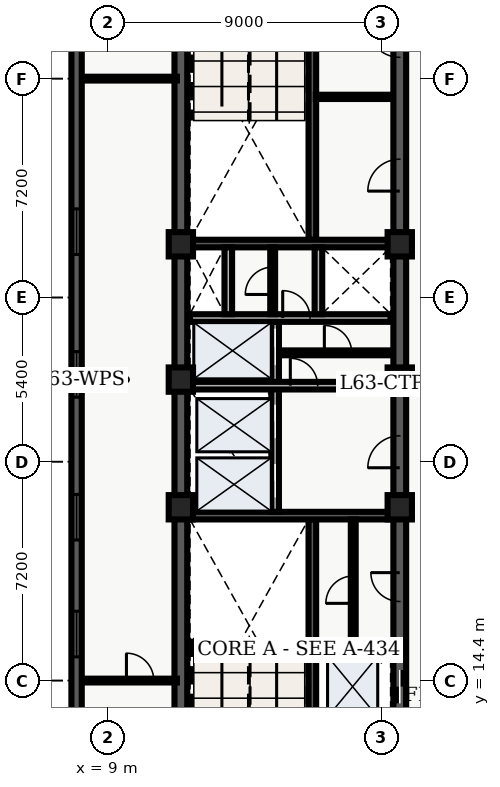
"""IFC4 building model, lengths in metres.
Left out: names, types, materials, properties, quantities, classifications, styles, units other than length and angle.
Written with IfcOpenShell. Run it as: python <this file> out.ifc"""

import sys

from ifc_helpers import new_model, entity, si_unit, converted_unit, direction, frame, origin_with_axes, origin_2d_with_axis, place, context, subcontext, project, spatial, polyline, rectangle, outline, extrude, element, fill, save


model = new_model("IFC4")
c1 = context("Model", 3, precision=1e-05, world=origin_with_axes(), true_north=direction((0.0, 1.0)))
c2 = subcontext(c1, "Body", "Model", "MODEL_VIEW")
j1 = project(units=[si_unit("LENGTHUNIT", "METRE"), converted_unit("PLANEANGLEUNIT", "DEGREE", entity("IfcPlaneAngleMeasure", 0.017), si_unit("PLANEANGLEUNIT", "RADIAN"), dimensions=[0, 0, 0, 0, 0, 0, 0])], contexts=[c1])
p1 = place(None, origin_with_axes())
s1 = spatial("IfcSite", under=j1, at=p1, CompositionType="ELEMENT")
p2 = place(p1, origin_with_axes())
s2 = spatial("IfcBuilding", under=s1, at=p2, CompositionType="ELEMENT")
p3 = place(p2, frame((0.0, 0.0, 256.8), z_axis=(0.0, 0.0, 1.0), x_axis=(1.0, 0.0, 0.0)))
s3 = spatial("IfcBuildingStorey", under=s2, at=p3, CompositionType="ELEMENT", Elevation=256.8)
p4 = place(p3, frame((11.4, 10.8, 0.0), z_axis=(0.0, 0.0, 1.0), x_axis=(0.0, 1.0, 0.0)))
e1 = element("IfcWall", 1, at=p4, inside=s3, PredefinedType="SHEAR", context=c2, shape_type="SweptSolid", body=[
    extrude(outline(polyline([(0.0, -0.21), (27.0, -0.21), (27.0, 0.21), (0.0, 0.21), (0.0, -0.21)])), origin_with_axes(), (0.0, 0.0, 1.0), 3.66),
])
p5 = place(p3, frame((18.6, 10.8, 0.0), z_axis=(0.0, 0.0, 1.0), x_axis=(0.0, 1.0, 0.0)))
e2 = element("IfcWall", 2, at=p5, inside=s3, PredefinedType="SHEAR", context=c2, shape_type="SweptSolid", body=[
    extrude(outline(polyline([(0.0, -0.21), (13.5, -0.21), (13.5, 0.21), (0.0, 0.21), (0.0, -0.21)])), origin_with_axes(), (0.0, 0.0, 1.0), 3.66),
])
p6 = place(p5, frame((1.3, 0.0, 0.0), z_axis=(0.0, 0.0, 1.0), x_axis=(1.0, 0.0, 0.0)))
e3 = element("IfcOpeningElement", 3, at=p6, cuts=e2, PredefinedType="OPENING", context=c2, shape_type="SweptSolid", body=[
    extrude(rectangle(XDim=1.1, YDim=0.44, at=origin_2d_with_axis()), origin_with_axes(), (0.0, 0.0, 1.0), 2.15),
])
p7 = place(p5, frame((3.4, 0.0, 0.0), z_axis=(0.0, 0.0, 1.0), x_axis=(1.0, 0.0, 0.0)))
e4 = element("IfcOpeningElement", 4, at=p7, cuts=e2, PredefinedType="OPENING", context=c2, shape_type="SweptSolid", body=[
    extrude(rectangle(XDim=1.1, YDim=0.44, at=origin_2d_with_axis()), origin_with_axes(), (0.0, 0.0, 1.0), 2.15),
])
p8 = place(p5, frame((11.125, 0.0, 0.0), z_axis=(0.0, 0.0, 1.0), x_axis=(1.0, 0.0, 0.0)))
e5 = element("IfcOpeningElement", 5, at=p8, cuts=e2, PredefinedType="OPENING", context=c2, shape_type="SweptSolid", body=[
    extrude(rectangle(XDim=1.05, YDim=0.44, at=origin_2d_with_axis()), origin_with_axes(), (0.0, 0.0, 1.0), 2.15),
])
p9 = place(p5, frame((6.675, 0.0, 0.0), z_axis=(0.0, 0.0, 1.0), x_axis=(1.0, 0.0, 0.0)))
e6 = element("IfcOpeningElement", 6, at=p9, cuts=e2, PredefinedType="OPENING", context=c2, shape_type="SweptSolid", body=[
    extrude(rectangle(XDim=0.95, YDim=0.44, at=origin_2d_with_axis()), origin_with_axes(), (0.0, 0.0, 1.0), 2.15),
])
p10 = place(p3, frame((18.6, 24.3, 0.0), z_axis=(0.0, 0.0, 1.0), x_axis=(0.0, 1.0, 0.0)))
e7 = element("IfcWall", 7, at=p10, inside=s3, PredefinedType="SHEAR", context=c2, shape_type="SweptSolid", body=[
    extrude(outline(polyline([(0.0, -0.21), (13.5, -0.21), (13.5, 0.21), (0.0, 0.21), (0.0, -0.21)])), origin_with_axes(), (0.0, 0.0, 1.0), 3.66),
])
p11 = place(p10, frame((6.725, 0.0, 0.0), z_axis=(0.0, 0.0, 1.0), x_axis=(1.0, 0.0, 0.0)))
e8 = element("IfcOpeningElement", 8, at=p11, cuts=e7, PredefinedType="OPENING", context=c2, shape_type="SweptSolid", body=[
    extrude(rectangle(XDim=1.05, YDim=0.44, at=origin_2d_with_axis()), origin_with_axes(), (0.0, 0.0, 1.0), 2.15),
])
p12 = place(p10, frame((11.125, 0.0, 0.0), z_axis=(0.0, 0.0, 1.0), x_axis=(1.0, 0.0, 0.0)))
e9 = element("IfcOpeningElement", 9, at=p12, cuts=e7, PredefinedType="OPENING", context=c2, shape_type="SweptSolid", body=[
    extrude(rectangle(XDim=1.05, YDim=0.44, at=origin_2d_with_axis()), origin_with_axes(), (0.0, 0.0, 1.0), 2.15),
])
p13 = place(p3, frame((15.725, 11.01, 0.0), z_axis=(0.0, 0.0, 1.0), x_axis=(0.0, 1.0, 0.0)))
e10 = element("IfcWall", 10, at=p13, inside=s3, PredefinedType="SHEAR", context=c2, shape_type="SweptSolid", body=[
    extrude(outline(polyline([(0.0, -0.125), (8.69, -0.125), (8.69, 0.125), (0.0, 0.125), (0.0, -0.125)])), origin_with_axes(), (0.0, 0.0, 1.0), 3.66),
])
p14 = place(p3, frame((11.61, 19.825, 0.0), z_axis=(0.0, 0.0, 1.0), x_axis=(1.0, 0.0, 0.0)))
e11 = element("IfcWall", 11, at=p14, inside=s3, PredefinedType="SHEAR", context=c2, shape_type="SweptSolid", body=[
    extrude(outline(polyline([(0.0, -0.125), (6.78, -0.125), (6.78, 0.125), (0.0, 0.125), (0.0, -0.125)])), origin_with_axes(), (0.0, 0.0, 1.0), 3.66),
])
p15 = place(p3, frame((15.725, 28.9, 0.0), z_axis=(0.0, 0.0, 1.0), x_axis=(0.0, 1.0, 0.0)))
e12 = element("IfcWall", 12, at=p15, inside=s3, PredefinedType="SHEAR", context=c2, shape_type="SweptSolid", body=[
    extrude(outline(polyline([(0.0, -0.125), (8.69, -0.125), (8.69, 0.125), (0.0, 0.125), (0.0, -0.125)])), origin_with_axes(), (0.0, 0.0, 1.0), 3.66),
])
p16 = place(p3, frame((11.61, 28.775, 0.0), z_axis=(0.0, 0.0, 1.0), x_axis=(1.0, 0.0, 0.0)))
e13 = element("IfcWall", 13, at=p16, inside=s3, PredefinedType="SHEAR", context=c2, shape_type="SweptSolid", body=[
    extrude(outline(polyline([(0.0, -0.125), (6.78, -0.125), (6.78, 0.125), (0.0, 0.125), (0.0, -0.125)])), origin_with_axes(), (0.0, 0.0, 1.0), 3.66),
])
p17 = place(p3, frame((14.5, 19.95, 0.0), z_axis=(0.0, 0.0, 1.0), x_axis=(0.0, 1.0, 0.0)))
e14 = element("IfcWall", 14, at=p17, inside=s3, PredefinedType="SOLIDWALL", context=c2, shape_type="SweptSolid", body=[
    extrude(outline(polyline([(0.0, -0.125), (6.25, -0.125), (6.25, 0.125), (0.0, 0.125), (0.0, -0.125)])), origin_with_axes(), (0.0, 0.0, 1.0), 2.7),
])
p18 = place(p17, frame((1.025, 0.0, 0.0), z_axis=(0.0, 0.0, 1.0), x_axis=(1.0, 0.0, 0.0)))
e15 = element("IfcOpeningElement", 15, at=p18, cuts=e14, PredefinedType="OPENING", context=c2, shape_type="SweptSolid", body=[
    extrude(rectangle(XDim=1.1, YDim=0.27, at=origin_2d_with_axis()), origin_with_axes(), (0.0, 0.0, 1.0), 2.15),
])
p19 = place(p17, frame((2.975, 0.0, 0.0), z_axis=(0.0, 0.0, 1.0), x_axis=(1.0, 0.0, 0.0)))
e16 = element("IfcOpeningElement", 16, at=p19, cuts=e14, PredefinedType="OPENING", context=c2, shape_type="SweptSolid", body=[
    extrude(rectangle(XDim=1.1, YDim=0.27, at=origin_2d_with_axis()), origin_with_axes(), (0.0, 0.0, 1.0), 2.15),
])
p20 = place(p17, frame((5.425, 0.0, 0.0), z_axis=(0.0, 0.0, 1.0), x_axis=(1.0, 0.0, 0.0)))
e17 = element("IfcOpeningElement", 17, at=p20, cuts=e14, PredefinedType="OPENING", context=c2, shape_type="SweptSolid", body=[
    extrude(rectangle(XDim=1.2, YDim=0.27, at=origin_2d_with_axis()), origin_with_axes(), (0.0, 0.0, 1.0), 2.15),
])
p21 = place(p3, frame((11.7, 24.1, 0.0), z_axis=(0.0, 0.0, 1.0), x_axis=(1.0, 0.0, 0.0)))
e18 = element("IfcWall", 18, at=p21, inside=s3, PredefinedType="SOLIDWALL", context=c2, shape_type="SweptSolid", body=[
    extrude(outline(polyline([(0.0, -0.125), (6.6, -0.125), (6.6, 0.125), (0.0, 0.125), (0.0, -0.125)])), origin_with_axes(), (0.0, 0.0, 1.0), 2.7),
])
p22 = place(p21, frame((3.75, 0.0, 0.0), z_axis=(0.0, 0.0, 1.0), x_axis=(1.0, 0.0, 0.0)))
e19 = element("IfcOpeningElement", 19, at=p22, cuts=e18, PredefinedType="OPENING", context=c2, shape_type="SweptSolid", body=[
    extrude(rectangle(XDim=0.9, YDim=0.27, at=origin_2d_with_axis()), origin_with_axes(), (0.0, 0.0, 1.0), 2.15),
])
p23 = place(p3, frame((11.7, 26.325, 0.0), z_axis=(0.0, 0.0, 1.0), x_axis=(1.0, 0.0, 0.0)))
e20 = element("IfcWall", 20, at=p23, inside=s3, PredefinedType="SOLIDWALL", context=c2, shape_type="SweptSolid", body=[
    extrude(outline(polyline([(0.0, -0.125), (6.6, -0.125), (6.6, 0.125), (0.0, 0.125), (0.0, -0.125)])), origin_with_axes(), (0.0, 0.0, 1.0), 2.7),
])
p24 = place(p23, frame((3.5, 0.0, 0.0), z_axis=(0.0, 0.0, 1.0), x_axis=(1.0, 0.0, 0.0)))
e21 = element("IfcOpeningElement", 21, at=p24, cuts=e20, PredefinedType="OPENING", context=c2, shape_type="SweptSolid", body=[
    extrude(rectangle(XDim=0.9, YDim=0.27, at=origin_2d_with_axis()), origin_with_axes(), (0.0, 0.0, 1.0), 2.15),
])
for number, where, z_axis, x_axis in (
    (22, (12.96, 26.45, 0.0), (0.0, 0.0, 1.0), (0.0, 1.0, 0.0)),
    (23, (15.925, 26.45, 0.0), (0.0, 0.0, 1.0), (0.0, 1.0, 0.0)),
):
    element("IfcWall", number, at=place(p3, frame(where, z_axis=z_axis, x_axis=x_axis)), inside=s3, PredefinedType="SOLIDWALL", context=c2, shape_type="SweptSolid", body=[
        extrude(outline(polyline([(0.0, -0.125), (2.2, -0.125), (2.2, 0.125), (0.0, 0.125), (0.0, -0.125)])), origin_with_axes(), (0.0, 0.0, 1.0), 2.7),
    ])
for number, where, z_axis, x_axis in (
    (24, (11.4, 20.1, 0.0), (0.0, 0.0, 1.0), (1.0, 0.0, 0.0)),
    (25, (11.4, 24.3, 0.0), (0.0, 0.0, 1.0), (1.0, 0.0, 0.0)),
    (26, (11.4, 28.75, 0.0), (0.0, 0.0, 1.0), (1.0, 0.0, 0.0)),
    (27, (18.6, 20.1, 0.0), (0.0, 0.0, 1.0), (1.0, 0.0, 0.0)),
    (28, (18.6, 24.3, 0.0), (0.0, 0.0, 1.0), (1.0, 0.0, 0.0)),
    (29, (18.6, 28.75, 0.0), (0.0, 0.0, 1.0), (1.0, 0.0, 0.0)),
):
    element("IfcColumn", number, at=place(p3, frame(where, z_axis=z_axis, x_axis=x_axis)), inside=s3, PredefinedType="COLUMN", context=c2, shape_type="SweptSolid", body=[
        extrude(rectangle(XDim=0.8, YDim=0.8, at=origin_2d_with_axis()), origin_with_axes(), (0.0, 0.0, 1.0), 3.9),
    ])
p25 = place(p3, frame((14.62, 25.18, 0.0), z_axis=(0.0, 0.0, 1.0), x_axis=(1.0, 0.0, 0.0)))
e30 = element("IfcWall", 30, at=p25, inside=s3, PredefinedType="PARTITIONING", context=c2, shape_type="SweptSolid", body=[
    extrude(outline(polyline([(0.0, -0.08), (3.68, -0.08), (3.68, 0.08), (0.0, 0.08), (0.0, -0.08)])), origin_with_axes(), (0.0, 0.0, 1.0), 2.7),
])
p26 = place(p25, frame((1.95, 0.0, 0.0), z_axis=(0.0, 0.0, 1.0), x_axis=(1.0, 0.0, 0.0)))
e31 = element("IfcOpeningElement", 31, at=p26, cuts=e30, PredefinedType="OPENING", context=c2, shape_type="SweptSolid", body=[
    extrude(rectangle(XDim=0.9, YDim=0.18, at=origin_2d_with_axis()), origin_with_axes(), (0.0, 0.0, 1.0), 2.15),
])
p27 = place(p3, frame((14.42, 26.45, 0.0), z_axis=(0.0, 0.0, 1.0), x_axis=(0.0, 1.0, 0.0)))
e32 = element("IfcWall", 32, at=p27, inside=s3, PredefinedType="PARTITIONING", context=c2, shape_type="SweptSolid", body=[
    extrude(outline(polyline([(0.0, -0.08), (2.2, -0.08), (2.2, 0.08), (0.0, 0.08), (0.0, -0.08)])), origin_with_axes(), (0.0, 0.0, 1.0), 2.7),
])
p28 = place(p27, frame((1.1, 0.0, 0.0), z_axis=(0.0, 0.0, 1.0), x_axis=(1.0, 0.0, 0.0)))
e33 = element("IfcOpeningElement", 33, at=p28, cuts=e32, PredefinedType="OPENING", context=c2, shape_type="SweptSolid", body=[
    extrude(rectangle(XDim=0.9, YDim=0.18, at=origin_2d_with_axis()), origin_with_axes(), (0.0, 0.0, 1.0), 2.15),
])
p29 = place(p3, frame((15.84, 15.27, 0.0), z_axis=(0.0, 0.0, 1.0), x_axis=(1.0, 0.0, 0.0)))
e34 = element("IfcWall", 34, at=p29, inside=s3, PredefinedType="SOLIDWALL", context=c2, shape_type="SweptSolid", body=[
    extrude(outline(polyline([(0.0, -0.125), (2.46, -0.125), (2.46, 0.125), (0.0, 0.125), (0.0, -0.125)])), origin_with_axes(), (0.0, 0.0, 1.0), 2.7),
])
p30 = place(p3, frame((17.07, 15.34, 0.0), z_axis=(0.0, 0.0, 1.0), x_axis=(0.0, 1.0, 0.0)))
e35 = element("IfcWall", 35, at=p30, inside=s3, PredefinedType="PARTITIONING", context=c2, shape_type="SweptSolid", body=[
    extrude(outline(polyline([(0.0, -0.08), (4.36, -0.08), (4.36, 0.08), (0.0, 0.08), (0.0, -0.08)])), origin_with_axes(), (0.0, 0.0, 1.0), 2.7),
])
p31 = place(p30, frame((2.05, 0.0, 0.0), z_axis=(0.0, 0.0, 1.0), x_axis=(1.0, 0.0, 0.0)))
e36 = element("IfcOpeningElement", 36, at=p31, cuts=e35, PredefinedType="OPENING", context=c2, shape_type="SweptSolid", body=[
    extrude(rectangle(XDim=0.9, YDim=0.18, at=origin_2d_with_axis()), origin_with_axes(), (0.0, 0.0, 1.0), 2.15),
])
p32 = place(p3, frame((15.84, 33.6, 0.0), z_axis=(0.0, 0.0, 1.0), x_axis=(1.0, 0.0, 0.0)))
e37 = element("IfcWall", 37, at=p32, inside=s3, PredefinedType="PARTITIONING", context=c2, shape_type="SweptSolid", body=[
    extrude(outline(polyline([(0.0, -0.07), (2.46, -0.07), (2.46, 0.07), (0.0, 0.07), (0.0, -0.07)])), origin_with_axes(), (0.0, 0.0, 1.0), 2.7),
])
p33 = place(p3, frame((8.135, 14.4, 0.0), z_axis=(0.0, 0.0, 1.0), x_axis=(1.0, 0.0, 0.0)))
e38 = element("IfcWall", 38, at=p33, inside=s3, PredefinedType="PARTITIONING", context=c2, shape_type="SweptSolid", body=[
    extrude(outline(polyline([(0.0, -0.062), (3.135, -0.062), (3.135, 0.062), (0.0, 0.062), (0.0, -0.062)])), origin_with_axes(), (0.0, 0.0, 1.0), 2.7),
])
p34 = place(p33, frame((1.925, 0.0, 0.0), z_axis=(0.0, 0.0, 1.0), x_axis=(1.0, 0.0, 0.0)))
e39 = element("IfcOpeningElement", 39, at=p34, cuts=e38, PredefinedType="OPENING", context=c2, shape_type="SweptSolid", body=[
    extrude(rectangle(XDim=0.9, YDim=0.145, at=origin_2d_with_axis()), origin_with_axes(), (0.0, 0.0, 1.0), 2.15),
])
p35 = place(p3, frame((8.135, 34.2, 0.0), z_axis=(0.0, 0.0, 1.0), x_axis=(1.0, 0.0, 0.0)))
e40 = element("IfcWall", 40, at=p35, inside=s3, PredefinedType="PARTITIONING", context=c2, shape_type="SweptSolid", body=[
    extrude(outline(polyline([(0.0, -0.062), (3.135, -0.062), (3.135, 0.062), (0.0, 0.062), (0.0, -0.062)])), origin_with_axes(), (0.0, 0.0, 1.0), 2.7),
])
p36 = place(p3, frame((7.97, 2.74, 0.0), z_axis=(0.0, 0.0, 1.0), x_axis=(0.0, 1.0, 0.0)))
e41 = element("IfcWall", 41, at=p36, inside=s3, PredefinedType="SOLIDWALL", context=c2, shape_type="SweptSolid", body=[
    extrude(outline(polyline([(0.0, -0.17), (43.46, -0.17), (43.46, 0.17), (0.0, 0.17), (0.0, -0.17)])), origin_with_axes(), (0.0, 0.0, 1.0), 3.66),
])
p37 = place(p36, frame((2.948, 0.0, 0.45), z_axis=(0.0, 0.0, 1.0), x_axis=(1.0, 0.0, 0.0)))
e42 = element("IfcOpeningElement", 42, at=p37, cuts=e41, PredefinedType="OPENING", context=c2, shape_type="SweptSolid", body=[
    extrude(rectangle(XDim=1.5, YDim=0.36, at=origin_2d_with_axis()), origin_with_axes(), (0.0, 0.0, 1.0), 2.1),
])
p38 = place(p36, frame((7.643, 0.0, 0.45), z_axis=(0.0, 0.0, 1.0), x_axis=(1.0, 0.0, 0.0)))
e43 = element("IfcOpeningElement", 43, at=p38, cuts=e41, PredefinedType="OPENING", context=c2, shape_type="SweptSolid", body=[
    extrude(rectangle(XDim=1.5, YDim=0.36, at=origin_2d_with_axis()), origin_with_axes(), (0.0, 0.0, 1.0), 2.1),
])
p39 = place(p36, frame((13.189, 0.0, 0.45), z_axis=(0.0, 0.0, 1.0), x_axis=(1.0, 0.0, 0.0)))
e44 = element("IfcOpeningElement", 44, at=p39, cuts=e41, PredefinedType="OPENING", context=c2, shape_type="SweptSolid", body=[
    extrude(rectangle(XDim=1.5, YDim=0.36, at=origin_2d_with_axis()), origin_with_axes(), (0.0, 0.0, 1.0), 2.1),
])
p40 = place(p36, frame((17.034, 0.0, 0.45), z_axis=(0.0, 0.0, 1.0), x_axis=(1.0, 0.0, 0.0)))
e45 = element("IfcOpeningElement", 45, at=p40, cuts=e41, PredefinedType="OPENING", context=c2, shape_type="SweptSolid", body=[
    extrude(rectangle(XDim=1.5, YDim=0.36, at=origin_2d_with_axis()), origin_with_axes(), (0.0, 0.0, 1.0), 2.1),
])
p41 = place(p36, frame((21.73, 0.0, 0.45), z_axis=(0.0, 0.0, 1.0), x_axis=(1.0, 0.0, 0.0)))
e46 = element("IfcOpeningElement", 46, at=p41, cuts=e41, PredefinedType="OPENING", context=c2, shape_type="SweptSolid", body=[
    extrude(rectangle(XDim=1.5, YDim=0.36, at=origin_2d_with_axis()), origin_with_axes(), (0.0, 0.0, 1.0), 2.1),
])
p42 = place(p36, frame((26.426, 0.0, 0.45), z_axis=(0.0, 0.0, 1.0), x_axis=(1.0, 0.0, 0.0)))
e47 = element("IfcOpeningElement", 47, at=p42, cuts=e41, PredefinedType="OPENING", context=c2, shape_type="SweptSolid", body=[
    extrude(rectangle(XDim=1.5, YDim=0.36, at=origin_2d_with_axis()), origin_with_axes(), (0.0, 0.0, 1.0), 2.1),
])
p43 = place(p36, frame((35.817, 0.0, 0.45), z_axis=(0.0, 0.0, 1.0), x_axis=(1.0, 0.0, 0.0)))
e48 = element("IfcOpeningElement", 48, at=p43, cuts=e41, PredefinedType="OPENING", context=c2, shape_type="SweptSolid", body=[
    extrude(rectangle(XDim=1.5, YDim=0.36, at=origin_2d_with_axis()), origin_with_axes(), (0.0, 0.0, 1.0), 2.1),
])
p44 = place(p36, frame((40.512, 0.0, 0.45), z_axis=(0.0, 0.0, 1.0), x_axis=(1.0, 0.0, 0.0)))
e49 = element("IfcOpeningElement", 49, at=p44, cuts=e41, PredefinedType="OPENING", context=c2, shape_type="SweptSolid", body=[
    extrude(rectangle(XDim=1.5, YDim=0.36, at=origin_2d_with_axis()), origin_with_axes(), (0.0, 0.0, 1.0), 2.1),
])
p45 = place(p5, frame((3.4, 0.0, 0.0), z_axis=(0.0, 0.0, 1.0), x_axis=(1.0, 0.0, 0.0)))
e50 = element("IfcDoor", 50, at=p45, inside=s3, OperationType="SLIDING_TO_RIGHT", PredefinedType="DOOR", context=c2, shape_type="SweptSolid", body=[
    extrude(rectangle(XDim=1.1, YDim=0.09, at=origin_2d_with_axis()), origin_with_axes(), (0.0, 0.0, 1.0), 2.15),
])
fill(e4, e50)
p46 = place(p17, frame((1.025, 0.0, 0.0), z_axis=(0.0, 0.0, 1.0), x_axis=(1.0, 0.0, 0.0)))
e51 = element("IfcDoor", 51, at=p46, inside=s3, OperationType="SLIDING_TO_LEFT", PredefinedType="DOOR", context=c2, shape_type="SweptSolid", body=[
    extrude(rectangle(XDim=1.1, YDim=0.09, at=origin_2d_with_axis()), origin_with_axes(), (0.0, 0.0, 1.0), 2.15),
])
fill(e15, e51)
p47 = place(p17, frame((2.975, 0.0, 0.0), z_axis=(0.0, 0.0, 1.0), x_axis=(1.0, 0.0, 0.0)))
e52 = element("IfcDoor", 52, at=p47, inside=s3, OperationType="SLIDING_TO_RIGHT", PredefinedType="DOOR", context=c2, shape_type="SweptSolid", body=[
    extrude(rectangle(XDim=1.1, YDim=0.09, at=origin_2d_with_axis()), origin_with_axes(), (0.0, 0.0, 1.0), 2.15),
])
fill(e16, e52)
p48 = place(p17, frame((5.425, 0.0, 0.0), z_axis=(0.0, 0.0, 1.0), x_axis=(1.0, 0.0, 0.0)))
e53 = element("IfcDoor", 53, at=p48, inside=s3, OperationType="DOUBLE_DOOR_SLIDING", PredefinedType="DOOR", context=c2, shape_type="SweptSolid", body=[
    extrude(rectangle(XDim=1.2, YDim=0.09, at=origin_2d_with_axis()), origin_with_axes(), (0.0, 0.0, 1.0), 2.15),
])
fill(e17, e53)
p49 = place(p5, frame((11.125, 0.0, 0.0), z_axis=(0.0, 0.0, 1.0), x_axis=(1.0, 0.0, 0.0)))
e54 = element("IfcDoor", 54, at=p49, inside=s3, OperationType="SINGLE_SWING_LEFT", PredefinedType="DOOR", context=c2, shape_type="SweptSolid", body=[
    extrude(rectangle(XDim=1.05, YDim=0.09, at=origin_2d_with_axis()), origin_with_axes(), (0.0, 0.0, 1.0), 2.15),
])
fill(e5, e54)
p50 = place(p23, frame((3.5, 0.0, 0.0), z_axis=(0.0, 0.0, 1.0), x_axis=(1.0, 0.0, 0.0)))
e55 = element("IfcDoor", 55, at=p50, inside=s3, OperationType="SINGLE_SWING_LEFT", PredefinedType="DOOR", context=c2, shape_type="SweptSolid", body=[
    extrude(rectangle(XDim=0.9, YDim=0.09, at=origin_2d_with_axis()), origin_with_axes(), (0.0, 0.0, 1.0), 2.15),
])
fill(e21, e55)
p51 = place(p27, frame((1.1, 0.0, 0.0), z_axis=(0.0, 0.0, 1.0), x_axis=(1.0, 0.0, 0.0)))
e56 = element("IfcDoor", 56, at=p51, inside=s3, OperationType="SINGLE_SWING_LEFT", PredefinedType="DOOR", context=c2, shape_type="SweptSolid", body=[
    extrude(rectangle(XDim=0.9, YDim=0.09, at=origin_2d_with_axis()), origin_with_axes(), (0.0, 0.0, 1.0), 2.15),
])
fill(e33, e56)
p52 = place(p21, frame((3.75, 0.0, 0.0), z_axis=(0.0, 0.0, 1.0), x_axis=(1.0, 0.0, 0.0)))
e57 = element("IfcDoor", 57, at=p52, inside=s3, OperationType="SINGLE_SWING_LEFT", PredefinedType="DOOR", context=c2, shape_type="SweptSolid", body=[
    extrude(rectangle(XDim=0.9, YDim=0.09, at=origin_2d_with_axis()), origin_with_axes(), (0.0, 0.0, 1.0), 2.15),
])
fill(e19, e57)
p53 = place(p25, frame((1.95, 0.0, 0.0), z_axis=(0.0, 0.0, 1.0), x_axis=(1.0, 0.0, 0.0)))
e58 = element("IfcDoor", 58, at=p53, inside=s3, OperationType="SINGLE_SWING_LEFT", PredefinedType="DOOR", context=c2, shape_type="SweptSolid", body=[
    extrude(rectangle(XDim=0.9, YDim=0.09, at=origin_2d_with_axis()), origin_with_axes(), (0.0, 0.0, 1.0), 2.15),
])
fill(e31, e58)
p54 = place(p30, frame((2.05, 0.0, 0.0), z_axis=(0.0, 0.0, 1.0), x_axis=(1.0, 0.0, 0.0)))
e59 = element("IfcDoor", 59, at=p54, inside=s3, OperationType="SINGLE_SWING_LEFT", PredefinedType="DOOR", context=c2, shape_type="SweptSolid", body=[
    extrude(rectangle(XDim=0.9, YDim=0.09, at=origin_2d_with_axis()), origin_with_axes(), (0.0, 0.0, 1.0), 2.15),
])
fill(e36, e59)
p55 = place(p5, frame((6.675, 0.0, 0.0), z_axis=(0.0, 0.0, 1.0), x_axis=(1.0, 0.0, 0.0)))
e60 = element("IfcDoor", 60, at=p55, inside=s3, OperationType="SINGLE_SWING_RIGHT", PredefinedType="DOOR", context=c2, shape_type="SweptSolid", body=[
    extrude(rectangle(XDim=0.95, YDim=0.09, at=origin_2d_with_axis()), origin_with_axes(), (0.0, 0.0, 1.0), 2.15),
])
fill(e6, e60)
p56 = place(p10, frame((6.725, 0.0, 0.0), z_axis=(0.0, 0.0, 1.0), x_axis=(1.0, 0.0, 0.0)))
e61 = element("IfcDoor", 61, at=p56, inside=s3, OperationType="SINGLE_SWING_LEFT", PredefinedType="DOOR", context=c2, shape_type="SweptSolid", body=[
    extrude(rectangle(XDim=1.05, YDim=0.09, at=origin_2d_with_axis()), origin_with_axes(), (0.0, 0.0, 1.0), 2.15),
])
fill(e8, e61)
p57 = place(p10, frame((11.125, 0.0, 0.0), z_axis=(0.0, 0.0, 1.0), x_axis=(1.0, 0.0, 0.0)))
e62 = element("IfcDoor", 62, at=p57, inside=s3, OperationType="SINGLE_SWING_RIGHT", PredefinedType="DOOR", context=c2, shape_type="SweptSolid", body=[
    extrude(rectangle(XDim=1.05, YDim=0.09, at=origin_2d_with_axis()), origin_with_axes(), (0.0, 0.0, 1.0), 2.15),
])
fill(e9, e62)
p58 = place(p33, frame((1.925, 0.0, 0.0), z_axis=(0.0, 0.0, 1.0), x_axis=(1.0, 0.0, 0.0)))
e63 = element("IfcDoor", 63, at=p58, inside=s3, OperationType="SINGLE_SWING_LEFT", PredefinedType="DOOR", context=c2, shape_type="SweptSolid", body=[
    extrude(rectangle(XDim=0.9, YDim=0.075, at=origin_2d_with_axis()), origin_with_axes(), (0.0, 0.0, 1.0), 2.15),
])
fill(e39, e63)
p59 = place(p36, frame((13.189, 0.0, 0.45), z_axis=(0.0, 0.0, 1.0), x_axis=(1.0, 0.0, 0.0)))
e64 = element("IfcWindow", 64, at=p59, inside=s3, PredefinedType="WINDOW", context=c2, shape_type="SweptSolid", body=[
    extrude(rectangle(XDim=1.5, YDim=0.09, at=origin_2d_with_axis()), origin_with_axes(), (0.0, 0.0, 1.0), 2.1),
])
fill(e44, e64)
p60 = place(p36, frame((17.034, 0.0, 0.45), z_axis=(0.0, 0.0, 1.0), x_axis=(1.0, 0.0, 0.0)))
e65 = element("IfcWindow", 65, at=p60, inside=s3, PredefinedType="WINDOW", context=c2, shape_type="SweptSolid", body=[
    extrude(rectangle(XDim=1.5, YDim=0.09, at=origin_2d_with_axis()), origin_with_axes(), (0.0, 0.0, 1.0), 2.1),
])
fill(e45, e65)
p61 = place(p36, frame((21.73, 0.0, 0.45), z_axis=(0.0, 0.0, 1.0), x_axis=(1.0, 0.0, 0.0)))
e66 = element("IfcWindow", 66, at=p61, inside=s3, PredefinedType="WINDOW", context=c2, shape_type="SweptSolid", body=[
    extrude(rectangle(XDim=1.5, YDim=0.09, at=origin_2d_with_axis()), origin_with_axes(), (0.0, 0.0, 1.0), 2.1),
])
fill(e46, e66)
p62 = place(p36, frame((26.426, 0.0, 0.45), z_axis=(0.0, 0.0, 1.0), x_axis=(1.0, 0.0, 0.0)))
e67 = element("IfcWindow", 67, at=p62, inside=s3, PredefinedType="WINDOW", context=c2, shape_type="SweptSolid", body=[
    extrude(rectangle(XDim=1.5, YDim=0.09, at=origin_2d_with_axis()), origin_with_axes(), (0.0, 0.0, 1.0), 2.1),
])
fill(e47, e67)
save(model, sys.argv[1])
